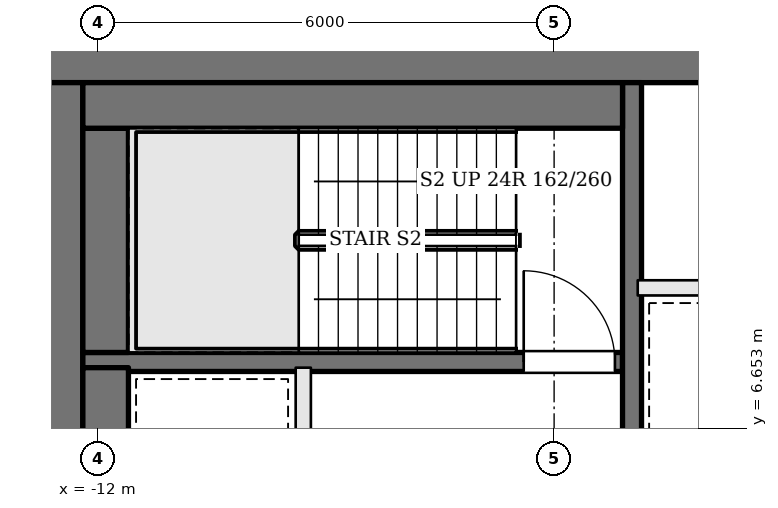
"""IFC4 building model, lengths in metres.
Left out: names, types, materials, properties, quantities, classifications, styles, units other than length and angle.
Written with IfcOpenShell. Run it as: python <this file> out.ifc"""

import sys

from ifc_helpers import new_model, si_unit, direction, frame, frame_2d, origin, place, context, subcontext, project, spatial, rectangle, extrude, element, fill, save


model = new_model("IFC4")
c1 = context("Model", 3, precision=1e-05, world=origin(), true_north=direction((0.0, 1.0)))
c2 = subcontext(c1, "Body", "Model", "MODEL_VIEW")
j1 = project(units=[si_unit("LENGTHUNIT", "METRE"), si_unit("PLANEANGLEUNIT", "RADIAN")], contexts=[c1])
p1 = place(None, origin())
s1 = spatial("IfcSite", under=j1, at=p1, CompositionType="ELEMENT")
p2 = place(p1, origin())
s2 = spatial("IfcBuilding", under=s1, at=p2, CompositionType="ELEMENT")
p3 = place(p2, frame((0.0, 0.0, 221.4)))
s3 = spatial("IfcBuildingStorey", under=s2, at=p3, CompositionType="ELEMENT", Elevation=221.4)
p4 = place(p3, frame((-13.0, 11.6, 0.0), z_axis=(0.0, 0.0, 1.0), x_axis=(1.0, 0.0, 0.0)))
e1 = element("IfcWall", 1, at=p4, inside=s3, PredefinedType="SHEAR", context=c2, shape_type="SweptSolid", body=[
    extrude(rectangle(XDim=26.0, YDim=0.8, at=frame_2d((13.0, 0.0))), origin(), (0.0, 0.0, 1.0), 3.9),
])
p5 = place(p4, frame((9.65, 0.0, 0.0)))
e2 = element("IfcOpeningElement", 2, at=p5, cuts=e1, PredefinedType="OPENING", context=c2, shape_type="SweptSolid", body=[
    extrude(rectangle(XDim=1.0, YDim=2.1, at=frame_2d((0.5, 1.05))), frame((0.0, 0.41, 0.0), z_axis=(0.0, -1.0, 0.0), x_axis=(1.0, 0.0, 0.0)), (0.0, 0.0, 1.0), 0.82),
])
p6 = place(p4, frame((12.675, 0.0, 0.0)))
e3 = element("IfcOpeningElement", 3, at=p6, cuts=e1, PredefinedType="OPENING", context=c2, shape_type="SweptSolid", body=[
    extrude(rectangle(XDim=0.7, YDim=2.1, at=frame_2d((0.35, 1.05))), frame((0.0, 0.41, 0.0), z_axis=(0.0, -1.0, 0.0), x_axis=(1.0, 0.0, 0.0)), (0.0, 0.0, 1.0), 0.82),
])
p7 = place(p4, frame((14.725, 0.0, 0.0)))
e4 = element("IfcOpeningElement", 4, at=p7, cuts=e1, PredefinedType="OPENING", context=c2, shape_type="SweptSolid", body=[
    extrude(rectangle(XDim=0.7, YDim=2.1, at=frame_2d((0.35, 1.05))), frame((0.0, 0.41, 0.0), z_axis=(0.0, -1.0, 0.0), x_axis=(1.0, 0.0, 0.0)), (0.0, 0.0, 1.0), 0.82),
])
p8 = place(p4, frame((16.6, 0.0, 0.0)))
e5 = element("IfcOpeningElement", 5, at=p8, cuts=e1, PredefinedType="OPENING", context=c2, shape_type="SweptSolid", body=[
    extrude(rectangle(XDim=1.0, YDim=2.1, at=frame_2d((0.5, 1.05))), frame((0.0, 0.41, 0.0), z_axis=(0.0, -1.0, 0.0), x_axis=(1.0, 0.0, 0.0)), (0.0, 0.0, 1.0), 0.82),
])
p9 = place(p3, frame((-12.6, -2.2, 0.0), z_axis=(0.0, 0.0, 1.0), x_axis=(0.0, 1.0, 0.0)))
e6 = element("IfcWall", 6, at=p9, inside=s3, PredefinedType="SHEAR", context=c2, shape_type="SweptSolid", body=[
    extrude(rectangle(XDim=13.4, YDim=0.8, at=frame_2d((6.7, 0.0))), origin(), (0.0, 0.0, 1.0), 3.9),
])
p10 = place(p9, frame((4.2, 0.0, 0.0)))
e7 = element("IfcOpeningElement", 7, at=p10, cuts=e6, PredefinedType="OPENING", context=c2, shape_type="SweptSolid", body=[
    extrude(rectangle(XDim=1.8, YDim=2.1, at=frame_2d((0.9, 1.05))), frame((0.0, 0.41, 0.0), z_axis=(0.0, -1.0, 0.0), x_axis=(1.0, 0.0, 0.0)), (0.0, 0.0, 1.0), 0.82),
])
p11 = place(p3, frame((-12.2, 7.525, 0.0), z_axis=(0.0, 0.0, 1.0), x_axis=(1.0, 0.0, 0.0)))
e8 = element("IfcWall", 8, at=p11, inside=s3, PredefinedType="SOLIDWALL", context=c2, shape_type="SweptSolid", body=[
    extrude(rectangle(XDim=7.1, YDim=0.25, at=frame_2d((3.55, 0.0))), origin(), (0.0, 0.0, 1.0), 3.7),
])
p12 = place(p11, frame((5.8, 0.0, 0.0)))
e9 = element("IfcOpeningElement", 9, at=p12, cuts=e8, PredefinedType="OPENING", context=c2, shape_type="SweptSolid", body=[
    extrude(rectangle(XDim=1.2, YDim=2.1, at=frame_2d((0.6, 1.05))), frame((0.0, 0.135, 0.0), z_axis=(0.0, -1.0, 0.0), x_axis=(1.0, 0.0, 0.0)), (0.0, 0.0, 1.0), 0.27),
])
p13 = place(p3, frame((-9.3, 4.45, 0.0), z_axis=(0.0, 0.0, 1.0), x_axis=(0.0, 1.0, 0.0)))
e10 = element("IfcWall", 10, at=p13, inside=s3, PredefinedType="SOLIDWALL", context=c2, shape_type="SweptSolid", body=[
    extrude(rectangle(XDim=3.0, YDim=0.2, at=frame_2d((1.5, 0.0))), origin(), (0.0, 0.0, 1.0), 3.7),
])
p14 = place(p3, frame((-4.975, -2.2, 0.0), z_axis=(0.0, 0.0, 1.0), x_axis=(0.0, 1.0, 0.0)))
e11 = element("IfcWall", 11, at=p14, inside=s3, PredefinedType="SOLIDWALL", context=c2, shape_type="SweptSolid", body=[
    extrude(rectangle(XDim=13.4, YDim=0.25, at=frame_2d((6.7, 0.0))), origin(), (0.0, 0.0, 1.0), 3.7),
])
p15 = place(p14, frame((5.25, 0.0, 0.0)))
e12 = element("IfcOpeningElement", 12, at=p15, cuts=e11, PredefinedType="OPENING", context=c2, shape_type="SweptSolid", body=[
    extrude(rectangle(XDim=1.2, YDim=2.1, at=frame_2d((0.6, 1.05))), frame((0.0, 0.135, 0.0), z_axis=(0.0, -1.0, 0.0), x_axis=(1.0, 0.0, 0.0)), (0.0, 0.0, 1.0), 0.27),
])
p16 = place(p3, frame((-11.9, 4.45, 0.0), z_axis=(0.0, 0.0, 1.0), x_axis=(0.0, 1.0, 0.0)))
e13 = element("IfcWall", 13, at=p16, inside=s3, PredefinedType="SOLIDWALL", context=c2, shape_type="SweptSolid", body=[
    extrude(rectangle(XDim=3.0, YDim=0.6, at=frame_2d((1.5, 0.0))), origin(), (0.0, 0.0, 1.0), 3.7),
])
p17 = place(p3, frame((-11.9, 7.65, 0.0), z_axis=(0.0, 0.0, 1.0), x_axis=(0.0, 1.0, 0.0)))
e14 = element("IfcWall", 14, at=p17, inside=s3, PredefinedType="SOLIDWALL", context=c2, shape_type="SweptSolid", body=[
    extrude(rectangle(XDim=2.95, YDim=0.6, at=frame_2d((1.475, 0.0))), origin(), (0.0, 0.0, 1.0), 3.7),
])
p18 = place(p3, frame((-12.2, 10.9, 0.0), z_axis=(0.0, 0.0, 1.0), x_axis=(1.0, 0.0, 0.0)))
e15 = element("IfcWall", 15, at=p18, inside=s3, PredefinedType="SOLIDWALL", context=c2, shape_type="SweptSolid", body=[
    extrude(rectangle(XDim=7.1, YDim=0.6, at=frame_2d((3.55, 0.0))), origin(), (0.0, 0.0, 1.0), 3.7),
])
p19 = place(p3, frame((-4.9, 8.5, 0.0), z_axis=(0.0, 0.0, 1.0), x_axis=(1.0, 0.0, 0.0)))
e16 = element("IfcWall", 16, at=p19, inside=s3, PredefinedType="SOLIDWALL", context=c2, shape_type="SweptSolid", body=[
    extrude(rectangle(XDim=9.8, YDim=0.2, at=frame_2d((4.9, 0.0))), origin(), (0.0, 0.0, 1.0), 3.7),
])
p20 = place(p12, origin())
e17 = element("IfcDoor", 17, at=p20, inside=s3, OperationType="SINGLE_SWING_LEFT", PredefinedType="DOOR", context=c2, shape_type="SweptSolid", body=[
    extrude(rectangle(XDim=1.2, YDim=2.1, at=frame_2d((0.6, 1.05))), frame((0.0, 0.025, 0.0), z_axis=(0.0, -1.0, 0.0), x_axis=(1.0, 0.0, 0.0)), (0.0, 0.0, 1.0), 0.05),
])
fill(e9, e17)
save(model, sys.argv[1])
